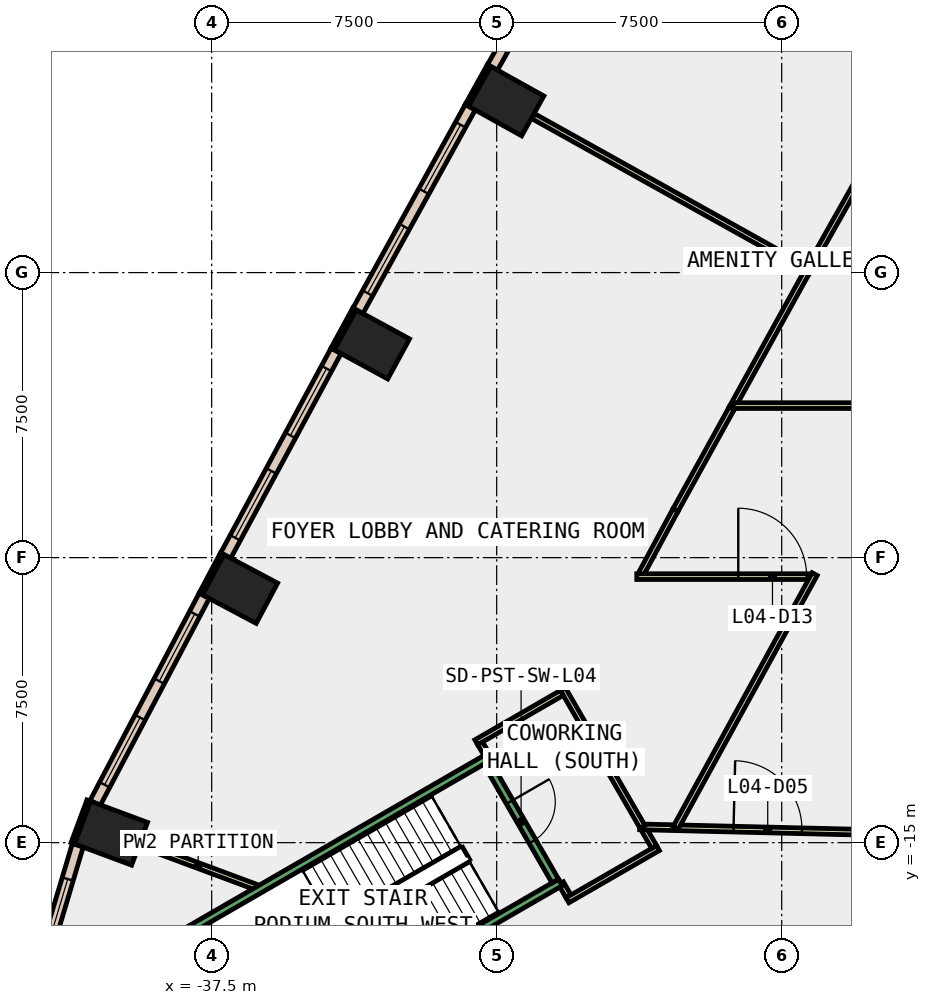
"""IFC4 building model, lengths in metres.
Left out: names, types, materials, properties, quantities, classifications, styles, units other than length and angle.
Written with IfcOpenShell. Run it as: python <this file> out.ifc"""

import sys

from ifc_helpers import new_model, si_unit, direction, frame, frame_2d, origin, origin_2d, place, context, subcontext, project, spatial, rectangle, extrude, element, fill, save


model = new_model("IFC4")
c1 = context("Model", 3, precision=1e-05, world=origin(), true_north=direction((0.0, 1.0)))
c2 = subcontext(c1, "Body", "Model", "MODEL_VIEW")
j1 = project(units=[si_unit("LENGTHUNIT", "METRE"), si_unit("PLANEANGLEUNIT", "RADIAN")], contexts=[c1])
p1 = place(None, origin())
s1 = spatial("IfcSite", under=j1, at=p1, CompositionType="ELEMENT")
p2 = place(p1, origin())
s2 = spatial("IfcBuilding", under=s1, at=p2, CompositionType="ELEMENT")
p3 = place(p2, frame((0.0, 0.0, 25.0)))
s3 = spatial("IfcBuildingStorey", under=s2, at=p3, CompositionType="ELEMENT", Elevation=25.0)
for number, where, z_axis, x_axis in (
    (1, (-29.75, 4.512, -0.45), (0.0, 0.0, 1.0), (0.487, 0.873, 0.0)),
    (2, (-33.283, -1.889, -0.45), (0.0, 0.0, 1.0), (0.478, 0.878, 0.0)),
    (3, (-36.753, -8.325, -0.45), (0.0, 0.0, 1.0), (0.469, 0.883, 0.0)),
    (4, (-40.147, -14.751, -0.45), (0.0, 0.0, 1.0), (0.348, 0.937, 0.0)),
):
    element("IfcColumn", number, at=place(p3, frame(where, z_axis=z_axis, x_axis=x_axis)), inside=s3, PredefinedType="COLUMN", context=c2, shape_type="SweptSolid", body=[
        extrude(rectangle(XDim=1.2, YDim=1.6, at=origin_2d()), origin(), (0.0, 0.0, 1.0), 5.0),
    ])
p4 = place(p3, frame((-30.2, 5.45, 0.0), z_axis=(0.0, 0.0, 1.0), x_axis=(-0.486817526853, -0.873503689488, 0.0)))
e5 = element("IfcWall", 5, at=p4, inside=s3, PredefinedType="STANDARD", context=c2, shape_type="SweptSolid", body=[
    extrude(rectangle(XDim=1.2, YDim=0.1, at=frame_2d((0.6, 0.0))), origin(), (0.0, 0.0, 1.0), 4.55),
])
p5 = place(p3, frame((-33.742, -0.956, 0.0), z_axis=(0.0, 0.0, 1.0), x_axis=(-0.478267644701, -0.878214131082, 0.0)))
e6 = element("IfcWall", 6, at=p5, inside=s3, PredefinedType="STANDARD", context=c2, shape_type="SweptSolid", body=[
    extrude(rectangle(XDim=1.2, YDim=0.1, at=frame_2d((0.6, 0.0))), origin(), (0.0, 0.0, 1.0), 4.55),
])
p6 = place(p3, frame((-37.222, -7.397, 0.0), z_axis=(0.0, 0.0, 1.0), x_axis=(-0.469383408131, -0.882994459876, 0.0)))
e7 = element("IfcWall", 7, at=p6, inside=s3, PredefinedType="STANDARD", context=c2, shape_type="SweptSolid", body=[
    extrude(rectangle(XDim=1.199, YDim=0.1, at=frame_2d((0.6, 0.0))), origin(), (0.0, 0.0, 1.0), 4.55),
])
p7 = place(p3, frame((-40.735, -13.893, 0.0), z_axis=(0.0, 0.0, 1.0), x_axis=(-0.348268249601, -0.937394914814, 0.0)))
e8 = element("IfcWall", 8, at=p7, inside=s3, PredefinedType="STANDARD", context=c2, shape_type="SweptSolid", body=[
    extrude(rectangle(XDim=1.2, YDim=0.1, at=frame_2d((0.6, 0.0))), origin(), (0.0, 0.0, 1.0), 4.55),
])
p8 = place(p3, frame((-27.101, 10.73, 0.0), z_axis=(0.0, 0.0, 1.0), x_axis=(-0.491661677717, -0.870786308267, 0.0)))
e9 = element("IfcWall", 9, at=p8, inside=s3, PredefinedType="STANDARD", context=c2, shape_type="SweptSolid", body=[
    extrude(rectangle(XDim=6.122, YDim=0.3, at=frame_2d((3.061, 0.0))), origin(), (0.0, 0.0, 1.0), 4.55),
])
p9 = place(p8, frame((0.531, 0.0, 1.0)))
e10 = element("IfcOpeningElement", 10, at=p9, cuts=e9, PredefinedType="OPENING", context=c2, shape_type="SweptSolid", body=[
    extrude(rectangle(XDim=2.0, YDim=3.2, at=frame_2d((1.0, 1.6))), frame((0.0, 0.16, 0.0), z_axis=(0.0, -1.0, 0.0), x_axis=(1.0, 0.0, 0.0)), (0.0, 0.0, 1.0), 0.32),
])
p10 = place(p8, frame((3.592, 0.0, 1.0)))
e11 = element("IfcOpeningElement", 11, at=p10, cuts=e9, PredefinedType="OPENING", context=c2, shape_type="SweptSolid", body=[
    extrude(rectangle(XDim=2.0, YDim=3.2, at=frame_2d((1.0, 1.6))), frame((0.0, 0.16, 0.0), z_axis=(0.0, -1.0, 0.0), x_axis=(1.0, 0.0, 0.0)), (0.0, 0.0, 1.0), 0.32),
])
p11 = place(p3, frame((-30.694, 4.353, 0.0), z_axis=(0.0, 0.0, 1.0), x_axis=(-0.483233380559, -0.875491576152, 0.0)))
e12 = element("IfcWall", 12, at=p11, inside=s3, PredefinedType="STANDARD", context=c2, shape_type="SweptSolid", body=[
    extrude(rectangle(XDim=6.121, YDim=0.3, at=frame_2d((3.061, 0.0))), origin(), (0.0, 0.0, 1.0), 4.55),
])
p12 = place(p11, frame((0.53, 0.0, 1.0)))
e13 = element("IfcOpeningElement", 13, at=p12, cuts=e12, PredefinedType="OPENING", context=c2, shape_type="SweptSolid", body=[
    extrude(rectangle(XDim=2.0, YDim=3.2, at=frame_2d((1.0, 1.6))), frame((0.0, 0.16, 0.0), z_axis=(0.0, -1.0, 0.0), x_axis=(1.0, 0.0, 0.0)), (0.0, 0.0, 1.0), 0.32),
])
p13 = place(p11, frame((3.591, 0.0, 1.0)))
e14 = element("IfcOpeningElement", 14, at=p13, cuts=e12, PredefinedType="OPENING", context=c2, shape_type="SweptSolid", body=[
    extrude(rectangle(XDim=2.0, YDim=3.2, at=frame_2d((1.0, 1.6))), frame((0.0, 0.16, 0.0), z_axis=(0.0, -1.0, 0.0), x_axis=(1.0, 0.0, 0.0)), (0.0, 0.0, 1.0), 0.32),
])
p14 = place(p3, frame((-34.226, -2.058, 0.0), z_axis=(0.0, 0.0, 1.0), x_axis=(-0.474584950749, -0.880209704856, 0.0)))
e15 = element("IfcWall", 15, at=p14, inside=s3, PredefinedType="STANDARD", context=c2, shape_type="SweptSolid", body=[
    extrude(rectangle(XDim=6.121, YDim=0.3, at=frame_2d((3.061, 0.0))), origin(), (0.0, 0.0, 1.0), 4.55),
])
p15 = place(p14, frame((0.53, 0.0, 1.0)))
e16 = element("IfcOpeningElement", 16, at=p15, cuts=e15, PredefinedType="OPENING", context=c2, shape_type="SweptSolid", body=[
    extrude(rectangle(XDim=2.0, YDim=3.2, at=frame_2d((1.0, 1.6))), frame((0.0, 0.16, 0.0), z_axis=(0.0, -1.0, 0.0), x_axis=(1.0, 0.0, 0.0)), (0.0, 0.0, 1.0), 0.32),
])
p16 = place(p14, frame((3.591, 0.0, 1.0)))
e17 = element("IfcOpeningElement", 17, at=p16, cuts=e15, PredefinedType="OPENING", context=c2, shape_type="SweptSolid", body=[
    extrude(rectangle(XDim=2.0, YDim=3.2, at=frame_2d((1.0, 1.6))), frame((0.0, 0.16, 0.0), z_axis=(0.0, -1.0, 0.0), x_axis=(1.0, 0.0, 0.0)), (0.0, 0.0, 1.0), 0.32),
])
p17 = place(p3, frame((-37.695, -8.503, 0.0), z_axis=(0.0, 0.0, 1.0), x_axis=(-0.466125129602, -0.884718804792, 0.0)))
e18 = element("IfcWall", 18, at=p17, inside=s3, PredefinedType="STANDARD", context=c2, shape_type="SweptSolid", body=[
    extrude(rectangle(XDim=6.164, YDim=0.3, at=frame_2d((3.082, 0.0))), origin(), (0.0, 0.0, 1.0), 4.55),
])
p18 = place(p17, frame((0.541, 0.0, 1.0)))
e19 = element("IfcOpeningElement", 19, at=p18, cuts=e18, PredefinedType="OPENING", context=c2, shape_type="SweptSolid", body=[
    extrude(rectangle(XDim=2.0, YDim=3.2, at=frame_2d((1.0, 1.6))), frame((0.0, 0.16, 0.0), z_axis=(0.0, -1.0, 0.0), x_axis=(1.0, 0.0, 0.0)), (0.0, 0.0, 1.0), 0.32),
])
p19 = place(p17, frame((3.623, 0.0, 1.0)))
e20 = element("IfcOpeningElement", 20, at=p19, cuts=e18, PredefinedType="OPENING", context=c2, shape_type="SweptSolid", body=[
    extrude(rectangle(XDim=2.0, YDim=3.2, at=frame_2d((1.0, 1.6))), frame((0.0, 0.16, 0.0), z_axis=(0.0, -1.0, 0.0), x_axis=(1.0, 0.0, 0.0)), (0.0, 0.0, 1.0), 0.32),
])
p20 = place(p3, frame((-41.022, -15.066, 0.0), z_axis=(0.0, 0.0, 1.0), x_axis=(-0.285800575124, -0.958289116738, 0.0)))
e21 = element("IfcWall", 21, at=p20, inside=s3, PredefinedType="STANDARD", context=c2, shape_type="SweptSolid", body=[
    extrude(rectangle(XDim=3.46, YDim=0.3, at=frame_2d((1.73, 0.0))), origin(), (0.0, 0.0, 1.0), 4.55),
])
p21 = place(p20, frame((0.93, 0.0, 1.0)))
e22 = element("IfcOpeningElement", 22, at=p21, cuts=e21, PredefinedType="OPENING", context=c2, shape_type="SweptSolid", body=[
    extrude(rectangle(XDim=1.6, YDim=3.2, at=frame_2d((0.8, 1.6))), frame((0.0, 0.16, 0.0), z_axis=(0.0, -1.0, 0.0), x_axis=(1.0, 0.0, 0.0)), (0.0, 0.0, 1.0), 0.32),
])
p22 = place(p3, frame((-39.378, -15.037, 0.0), z_axis=(0.0, 0.0, 1.0), x_axis=(0.937400028274, -0.348254485961, 0.0)))
e23 = element("IfcWall", 23, at=p22, inside=s3, PredefinedType="PARTITIONING", context=c2, shape_type="SweptSolid", body=[
    extrude(rectangle(XDim=3.247, YDim=0.15, at=frame_2d((1.624, 0.0))), origin(), (0.0, 0.0, 1.0), 4.55),
])
p23 = place(p3, frame((-28.309, -16.067, 0.0), z_axis=(0.0, 0.0, 1.0), x_axis=(0.499546646484, -0.86628698939, 0.0)))
e24 = element("IfcWall", 24, at=p23, inside=s3, PredefinedType="PARTITIONING", context=c2, shape_type="SweptSolid", body=[
    extrude(rectangle(XDim=0.401, YDim=0.15, at=frame_2d((0.2, 0.0))), origin(), (0.0, 0.0, 1.0), 4.55),
])
p24 = place(p3, frame((-28.137, -16.516, 0.0), z_axis=(0.0, 0.0, 1.0), x_axis=(0.866225489901, 0.499653280431, 0.0)))
e25 = element("IfcWall", 25, at=p24, inside=s3, PredefinedType="PARTITIONING", context=c2, shape_type="SweptSolid", body=[
    extrude(rectangle(XDim=2.75, YDim=0.15, at=frame_2d((1.375, 0.0))), origin(), (0.0, 0.0, 1.0), 4.55),
])
p25 = place(p3, frame((-25.857, -15.114, 0.0), z_axis=(0.0, 0.0, 1.0), x_axis=(-0.500357623318, 0.865818831389, 0.0)))
e26 = element("IfcWall", 26, at=p25, inside=s3, PredefinedType="PARTITIONING", context=c2, shape_type="SweptSolid", body=[
    extrude(rectangle(XDim=0.61, YDim=0.15, at=frame_2d((0.305, 0.0))), origin(), (0.0, 0.0, 1.0), 4.55),
])
p26 = place(p3, frame((-26.236, -14.584, 0.0), z_axis=(0.0, 0.0, 1.0), x_axis=(0.999706920069, -0.024208964564, 0.0)))
e27 = element("IfcWall", 27, at=p26, inside=s3, PredefinedType="PARTITIONING", context=c2, shape_type="SweptSolid", body=[
    extrude(rectangle(XDim=7.523, YDim=0.15, at=frame_2d((3.762, 0.0))), origin(), (0.0, 0.0, 1.0), 4.55),
])
p27 = place(p26, frame((2.469, 0.0, 0.0)))
e28 = element("IfcOpeningElement", 28, at=p27, cuts=e27, PredefinedType="OPENING", context=c2, shape_type="SweptSolid", body=[
    extrude(rectangle(XDim=1.8, YDim=2.1, at=frame_2d((0.9, 1.05))), frame((0.0, 0.085, 0.0), z_axis=(0.0, -1.0, 0.0), x_axis=(1.0, 0.0, 0.0)), (0.0, 0.0, 1.0), 0.17),
])
p28 = place(p3, frame((-21.735, 0.044, 0.0), z_axis=(0.0, 0.0, 1.0), x_axis=(-0.873435565137, 0.486939743248, 0.0)))
e29 = element("IfcWall", 29, at=p28, inside=s3, PredefinedType="PARTITIONING", context=c2, shape_type="SweptSolid", body=[
    extrude(rectangle(XDim=8.356, YDim=0.15, at=frame_2d((4.178, 0.0))), origin(), (0.0, 0.0, 1.0), 4.55),
])
p29 = place(p3, frame((-18.252, 6.368, 0.0), z_axis=(0.0, 0.0, 1.0), x_axis=(-0.491550482328, -0.87084908183, 0.0)))
e30 = element("IfcWall", 30, at=p29, inside=s3, PredefinedType="PARTITIONING", context=c2, shape_type="SweptSolid", body=[
    extrude(rectangle(XDim=7.145, YDim=0.15, at=frame_2d((3.572, 0.0))), origin(), (0.0, 0.0, 1.0), 4.55),
])
p30 = place(p3, frame((-26.162, -14.586, 0.0), z_axis=(0.0, 0.0, 1.0), x_axis=(-0.500142678011, 0.865943012924, 0.0)))
e31 = element("IfcWall", 31, at=p30, inside=s3, PredefinedType="PARTITIONING", context=c2, shape_type="SweptSolid", body=[
    extrude(rectangle(XDim=4.191, YDim=0.15, at=frame_2d((2.095, 0.0))), origin(), (0.0, 0.0, 1.0), 4.55),
])
p31 = place(p3, frame((-28.285, -11.059, 0.0), z_axis=(0.0, 0.0, 1.0), x_axis=(-0.866108986466, -0.499855202596, 0.0)))
e32 = element("IfcWall", 32, at=p31, inside=s3, PredefinedType="PARTITIONING", context=c2, shape_type="SweptSolid", body=[
    extrude(rectangle(XDim=2.6, YDim=0.15, at=frame_2d((1.3, 0.0))), origin(), (0.0, 0.0, 1.0), 4.55),
])
p32 = place(p3, frame((-30.434, -12.387, 0.0), z_axis=(0.0, 0.0, 1.0), x_axis=(0.500867716848, -0.865523847285, 0.0)))
e33 = element("IfcWall", 33, at=p32, inside=s3, PredefinedType="PARTITIONING", context=c2, shape_type="SweptSolid", body=[
    extrude(rectangle(XDim=0.4, YDim=0.15, at=frame_2d((0.2, 0.0))), origin(), (0.0, 0.0, 1.0), 4.55),
])
p33 = place(p3, frame((-25.294, -6.248, 0.0), z_axis=(0.0, 0.0, 1.0), x_axis=(-0.474533012185, -0.880237706728, 0.0)))
e34 = element("IfcWall", 34, at=p33, inside=s3, PredefinedType="PARTITIONING", context=c2, shape_type="SweptSolid", body=[
    extrude(rectangle(XDim=1.916, YDim=0.15, at=frame_2d((0.958, 0.0))), origin(), (0.0, 0.0, 1.0), 4.55),
])
p34 = place(p3, frame((-26.314, -8.0, 0.0), z_axis=(0.0, 0.0, 1.0), x_axis=(1.0, 0.0, 0.0)))
e35 = element("IfcWall", 35, at=p34, inside=s3, PredefinedType="PARTITIONING", context=c2, shape_type="SweptSolid", body=[
    extrude(rectangle(XDim=4.571, YDim=0.15, at=frame_2d((2.286, 0.0))), origin(), (0.0, 0.0, 1.0), 4.55),
])
p35 = place(p34, frame((2.671, 0.0, 0.0)))
e36 = element("IfcOpeningElement", 36, at=p35, cuts=e35, PredefinedType="OPENING", context=c2, shape_type="SweptSolid", body=[
    extrude(rectangle(XDim=1.8, YDim=2.1, at=frame_2d((0.9, 1.05))), frame((0.0, 0.085, 0.0), z_axis=(0.0, -1.0, 0.0), x_axis=(1.0, 0.0, 0.0)), (0.0, 0.0, 1.0), 0.17),
])
p36 = place(p3, frame((-21.632, -7.934, 0.0), z_axis=(0.0, 0.0, 1.0), x_axis=(-0.480597861754, -0.876941101373, 0.0)))
e37 = element("IfcWall", 37, at=p36, inside=s3, PredefinedType="PARTITIONING", context=c2, shape_type="SweptSolid", body=[
    extrude(rectangle(XDim=7.609, YDim=0.15, at=frame_2d((3.805, 0.0))), origin(), (0.0, 0.0, 1.0), 4.55),
])
p37 = place(p3, frame((-25.294, -6.248, 0.0), z_axis=(0.0, 0.0, 1.0), x_axis=(0.483368016909, 0.875417249219, 0.0)))
e38 = element("IfcWall", 38, at=p37, inside=s3, PredefinedType="PARTITIONING", context=c2, shape_type="SweptSolid", body=[
    extrude(rectangle(XDim=3.064, YDim=0.15, at=frame_2d((1.532, 0.0))), origin(), (0.0, 0.0, 1.0), 4.55),
])
p38 = place(p3, frame((-21.84, 0.01, 0.0), z_axis=(0.0, 0.0, 1.0), x_axis=(-0.483357057036, -0.875423300703, 0.0)))
e39 = element("IfcWall", 39, at=p38, inside=s3, PredefinedType="PARTITIONING", context=c2, shape_type="SweptSolid", body=[
    extrude(rectangle(XDim=4.084, YDim=0.15, at=frame_2d((2.042, 0.0))), origin(), (0.0, 0.0, 1.0), 4.55),
])
p39 = place(p3, frame((-23.777, -3.5, 0.0), z_axis=(0.0, 0.0, 1.0), x_axis=(1.0, 0.0, 0.0)))
e40 = element("IfcWall", 40, at=p39, inside=s3, PredefinedType="PARTITIONING", context=c2, shape_type="SweptSolid", body=[
    extrude(rectangle(XDim=13.385, YDim=0.15, at=frame_2d((6.692, 0.0))), origin(), (0.0, 0.0, 1.0), 4.55),
])
p40 = place(p39, frame((5.83, 0.0, 0.0)))
e41 = element("IfcOpeningElement", 41, at=p40, cuts=e40, PredefinedType="OPENING", context=c2, shape_type="SweptSolid", body=[
    extrude(rectangle(XDim=1.8, YDim=2.1, at=frame_2d((0.9, 1.05))), frame((0.0, 0.085, 0.0), z_axis=(0.0, -1.0, 0.0), x_axis=(1.0, 0.0, 0.0)), (0.0, 0.0, 1.0), 0.17),
])
for number, where, z_axis, x_axis in (
    (42, (-30.222, -12.755, 0.0), (0.0, 0.0, 1.0), (-0.866, -0.5, 0.0)),
    (43, (-28.322, -16.045, 0.0), (0.0, 0.0, 1.0), (-0.866, -0.5, 0.0)),
):
    element("IfcWall", number, at=place(p3, frame(where, z_axis=z_axis, x_axis=x_axis)), inside=s3, PredefinedType="STANDARD", context=c2, shape_type="SweptSolid", body=[
        extrude(rectangle(XDim=9.8, YDim=0.2, at=frame_2d((4.9, 0.0))), origin(), (0.0, 0.0, 1.0), 4.55),
    ])
p41 = place(p3, frame((-30.258, -12.891, 0.0), z_axis=(0.0, 0.0, 1.0), x_axis=(0.499982693035, -0.866035395735, 0.0)))
e44 = element("IfcWall", 44, at=p41, inside=s3, PredefinedType="STANDARD", context=c2, shape_type="SweptSolid", body=[
    extrude(rectangle(XDim=3.6, YDim=0.2, at=frame_2d((1.8, 0.0))), origin(), (0.0, 0.0, 1.0), 4.55),
])
p42 = place(p41, frame((1.2, 0.0, 0.0)))
e45 = element("IfcOpeningElement", 45, at=p42, cuts=e44, PredefinedType="OPENING", context=c2, shape_type="SweptSolid", body=[
    extrude(rectangle(XDim=1.2, YDim=2.2, at=frame_2d((0.6, 1.1))), frame((0.0, 0.11, 0.0), z_axis=(0.0, -1.0, 0.0), x_axis=(1.0, 0.0, 0.0)), (0.0, 0.0, 1.0), 0.22),
])
p43 = place(p12, origin())
e46 = element("IfcWindow", 46, at=p43, inside=s3, PartitioningType="SINGLE_PANEL", PredefinedType="WINDOW", context=c2, shape_type="SweptSolid", body=[
    extrude(rectangle(XDim=2.0, YDim=3.2, at=frame_2d((1.0, 1.6))), frame((0.0, 0.03, 0.0), z_axis=(0.0, -1.0, 0.0), x_axis=(1.0, 0.0, 0.0)), (0.0, 0.0, 1.0), 0.06),
])
fill(e13, e46)
p44 = place(p13, origin())
e47 = element("IfcWindow", 47, at=p44, inside=s3, PartitioningType="SINGLE_PANEL", PredefinedType="WINDOW", context=c2, shape_type="SweptSolid", body=[
    extrude(rectangle(XDim=2.0, YDim=3.2, at=frame_2d((1.0, 1.6))), frame((0.0, 0.03, 0.0), z_axis=(0.0, -1.0, 0.0), x_axis=(1.0, 0.0, 0.0)), (0.0, 0.0, 1.0), 0.06),
])
fill(e14, e47)
p45 = place(p15, origin())
e48 = element("IfcWindow", 48, at=p45, inside=s3, PartitioningType="SINGLE_PANEL", PredefinedType="WINDOW", context=c2, shape_type="SweptSolid", body=[
    extrude(rectangle(XDim=2.0, YDim=3.2, at=frame_2d((1.0, 1.6))), frame((0.0, 0.03, 0.0), z_axis=(0.0, -1.0, 0.0), x_axis=(1.0, 0.0, 0.0)), (0.0, 0.0, 1.0), 0.06),
])
fill(e16, e48)
p46 = place(p16, origin())
e49 = element("IfcWindow", 49, at=p46, inside=s3, PartitioningType="SINGLE_PANEL", PredefinedType="WINDOW", context=c2, shape_type="SweptSolid", body=[
    extrude(rectangle(XDim=2.0, YDim=3.2, at=frame_2d((1.0, 1.6))), frame((0.0, 0.03, 0.0), z_axis=(0.0, -1.0, 0.0), x_axis=(1.0, 0.0, 0.0)), (0.0, 0.0, 1.0), 0.06),
])
fill(e17, e49)
p47 = place(p18, origin())
e50 = element("IfcWindow", 50, at=p47, inside=s3, PartitioningType="SINGLE_PANEL", PredefinedType="WINDOW", context=c2, shape_type="SweptSolid", body=[
    extrude(rectangle(XDim=2.0, YDim=3.2, at=frame_2d((1.0, 1.6))), frame((0.0, 0.03, 0.0), z_axis=(0.0, -1.0, 0.0), x_axis=(1.0, 0.0, 0.0)), (0.0, 0.0, 1.0), 0.06),
])
fill(e19, e50)
p48 = place(p19, origin())
e51 = element("IfcWindow", 51, at=p48, inside=s3, PartitioningType="SINGLE_PANEL", PredefinedType="WINDOW", context=c2, shape_type="SweptSolid", body=[
    extrude(rectangle(XDim=2.0, YDim=3.2, at=frame_2d((1.0, 1.6))), frame((0.0, 0.03, 0.0), z_axis=(0.0, -1.0, 0.0), x_axis=(1.0, 0.0, 0.0)), (0.0, 0.0, 1.0), 0.06),
])
fill(e20, e51)
p49 = place(p21, origin())
e52 = element("IfcWindow", 52, at=p49, inside=s3, PartitioningType="SINGLE_PANEL", PredefinedType="WINDOW", context=c2, shape_type="SweptSolid", body=[
    extrude(rectangle(XDim=1.6, YDim=3.2, at=frame_2d((0.8, 1.6))), frame((0.0, 0.03, 0.0), z_axis=(0.0, -1.0, 0.0), x_axis=(1.0, 0.0, 0.0)), (0.0, 0.0, 1.0), 0.06),
])
fill(e22, e52)
p50 = place(p27, origin())
e53 = element("IfcDoor", 53, at=p50, inside=s3, OperationType="DOUBLE_DOOR_SINGLE_SWING", PredefinedType="DOOR", context=c2, shape_type="SweptSolid", body=[
    extrude(rectangle(XDim=1.8, YDim=2.1, at=frame_2d((0.9, 1.05))), frame((0.0, 0.025, 0.0), z_axis=(0.0, -1.0, 0.0), x_axis=(1.0, 0.0, 0.0)), (0.0, 0.0, 1.0), 0.05),
])
fill(e28, e53)
p51 = place(p35, origin())
e54 = element("IfcDoor", 54, at=p51, inside=s3, OperationType="DOUBLE_DOOR_SINGLE_SWING", PredefinedType="DOOR", context=c2, shape_type="SweptSolid", body=[
    extrude(rectangle(XDim=1.8, YDim=2.1, at=frame_2d((0.9, 1.05))), frame((0.0, 0.025, 0.0), z_axis=(0.0, -1.0, 0.0), x_axis=(1.0, 0.0, 0.0)), (0.0, 0.0, 1.0), 0.05),
])
fill(e36, e54)
p52 = place(p42, origin())
e55 = element("IfcDoor", 55, at=p52, inside=s3, OperationType="SINGLE_SWING_LEFT", PredefinedType="DOOR", context=c2, shape_type="SweptSolid", body=[
    extrude(rectangle(XDim=1.2, YDim=2.2, at=frame_2d((0.6, 1.1))), frame((0.0, 0.025, 0.0), z_axis=(0.0, -1.0, 0.0), x_axis=(1.0, 0.0, 0.0)), (0.0, 0.0, 1.0), 0.05),
])
fill(e45, e55)
save(model, sys.argv[1])
